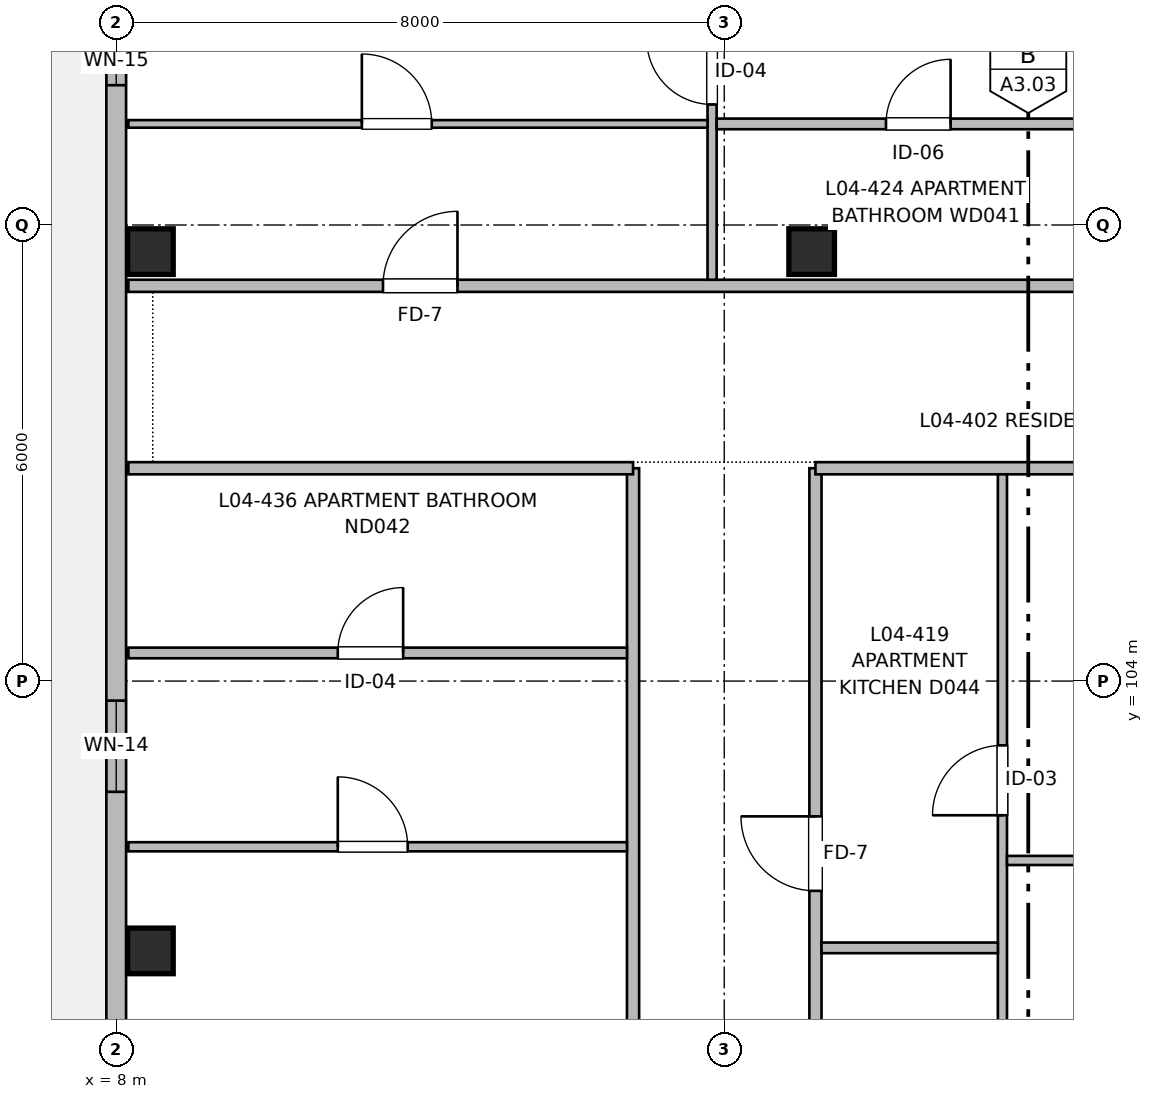
"""IFC4 building model, lengths in metres.
Left out: names, types, materials, properties, quantities, classifications, styles, units other than length and angle.
Written with IfcOpenShell. Run it as: python <this file> out.ifc"""

import sys

from ifc_helpers import new_model, si_unit, direction, frame, frame_2d, origin, origin_2d, place, context, subcontext, project, spatial, rectangle, extrude, element, fill, save


model = new_model("IFC4")
c1 = context("Model", 3, precision=1e-05, world=origin(), true_north=direction((0.0, 1.0)))
c2 = subcontext(c1, "Body", "Model", "MODEL_VIEW")
j1 = project(units=[si_unit("LENGTHUNIT", "METRE"), si_unit("PLANEANGLEUNIT", "RADIAN")], contexts=[c1])
p1 = place(None, origin())
s1 = spatial("IfcSite", under=j1, at=p1, CompositionType="ELEMENT")
p2 = place(p1, origin())
s2 = spatial("IfcBuilding", under=s1, at=p2, CompositionType="ELEMENT")
p3 = place(p2, frame((0.0, 0.0, 13.76)))
s3 = spatial("IfcBuildingStorey", under=s2, at=p3, CompositionType="ELEMENT", Elevation=13.76)
for number, where, z_axis, x_axis in (
    (1, (8.45, 100.45, 0.0), (0.0, 0.0, 1.0), (1.0, 0.0, 0.0)),
    (2, (8.45, 109.65, 0.0), (0.0, 0.0, 1.0), (1.0, 0.0, 0.0)),
    (3, (17.15, 109.65, 0.0), (0.0, 0.0, 1.0), (1.0, 0.0, 0.0)),
):
    element("IfcColumn", number, at=place(p3, frame(where, z_axis=z_axis, x_axis=x_axis)), inside=s3, PredefinedType="COLUMN", context=c2, shape_type="SweptSolid", body=[
        extrude(rectangle(XDim=0.6, YDim=0.6, at=origin_2d()), origin(), (0.0, 0.0, 1.0), 3.2),
    ])
p4 = place(p3, frame((8.0, 56.0, 0.0), z_axis=(0.0, 0.0, 1.0), x_axis=(0.0, 1.0, 0.0)))
e4 = element("IfcWall", 4, at=p4, inside=s3, PredefinedType="SOLIDWALL", context=c2, shape_type="SweptSolid", body=[
    extrude(rectangle(XDim=60.0, YDim=0.26, at=frame_2d((30.0, 0.0))), origin(), (0.0, 0.0, 1.0), 2.98),
])
p5 = place(p4, frame((3.686, 0.0, 0.0)))
e5 = element("IfcOpeningElement", 5, at=p5, cuts=e4, PredefinedType="OPENING", context=c2, shape_type="SweptSolid", body=[
    extrude(rectangle(XDim=1.2, YDim=2.2, at=frame_2d((0.6, 1.1))), frame((0.0, 0.14, 0.0), z_axis=(0.0, -1.0, 0.0), x_axis=(1.0, 0.0, 0.0)), (0.0, 0.0, 1.0), 0.28),
])
p6 = place(p4, frame((5.586, 0.0, 0.9)))
e6 = element("IfcOpeningElement", 6, at=p6, cuts=e4, PredefinedType="OPENING", context=c2, shape_type="SweptSolid", body=[
    extrude(rectangle(XDim=1.05, YDim=1.15, at=frame_2d((0.525, 0.575))), frame((0.0, 0.14, 0.0), z_axis=(0.0, -1.0, 0.0), x_axis=(1.0, 0.0, 0.0)), (0.0, 0.0, 1.0), 0.28),
])
p7 = place(p4, frame((12.207, 0.0, 0.82)))
e7 = element("IfcOpeningElement", 7, at=p7, cuts=e4, PredefinedType="OPENING", context=c2, shape_type="SweptSolid", body=[
    extrude(rectangle(XDim=1.3, YDim=1.4, at=frame_2d((0.65, 0.7))), frame((0.0, 0.14, 0.0), z_axis=(0.0, -1.0, 0.0), x_axis=(1.0, 0.0, 0.0)), (0.0, 0.0, 1.0), 0.28),
])
p8 = place(p4, frame((19.079, 0.0, 0.67)))
e8 = element("IfcOpeningElement", 8, at=p8, cuts=e4, PredefinedType="OPENING", context=c2, shape_type="SweptSolid", body=[
    extrude(rectangle(XDim=2.1, YDim=1.55, at=frame_2d((1.05, 0.775))), frame((0.0, 0.14, 0.0), z_axis=(0.0, -1.0, 0.0), x_axis=(1.0, 0.0, 0.0)), (0.0, 0.0, 1.0), 0.28),
])
p9 = place(p4, frame((29.325, 0.0, 0.72)))
e9 = element("IfcOpeningElement", 9, at=p9, cuts=e4, PredefinedType="OPENING", context=c2, shape_type="SweptSolid", body=[
    extrude(rectangle(XDim=2.25, YDim=1.5, at=frame_2d((1.125, 0.75))), frame((0.0, 0.14, 0.0), z_axis=(0.0, -1.0, 0.0), x_axis=(1.0, 0.0, 0.0)), (0.0, 0.0, 1.0), 0.28),
])
p10 = place(p4, frame((38.046, 0.0, 0.9)))
e10 = element("IfcOpeningElement", 10, at=p10, cuts=e4, PredefinedType="OPENING", context=c2, shape_type="SweptSolid", body=[
    extrude(rectangle(XDim=1.05, YDim=1.15, at=frame_2d((0.525, 0.575))), frame((0.0, 0.14, 0.0), z_axis=(0.0, -1.0, 0.0), x_axis=(1.0, 0.0, 0.0)), (0.0, 0.0, 1.0), 0.28),
])
p11 = place(p4, frame((46.543, 0.0, 0.9)))
e11 = element("IfcOpeningElement", 11, at=p11, cuts=e4, PredefinedType="OPENING", context=c2, shape_type="SweptSolid", body=[
    extrude(rectangle(XDim=1.2, YDim=1.05, at=frame_2d((0.6, 0.525))), frame((0.0, 0.14, 0.0), z_axis=(0.0, -1.0, 0.0), x_axis=(1.0, 0.0, 0.0)), (0.0, 0.0, 1.0), 0.28),
])
p12 = place(p4, frame((55.839, 0.0, 0.9)))
e12 = element("IfcOpeningElement", 12, at=p12, cuts=e4, PredefinedType="OPENING", context=c2, shape_type="SweptSolid", body=[
    extrude(rectangle(XDim=0.65, YDim=0.95, at=frame_2d((0.325, 0.475))), frame((0.0, 0.14, 0.0), z_axis=(0.0, -1.0, 0.0), x_axis=(1.0, 0.0, 0.0)), (0.0, 0.0, 1.0), 0.28),
])
p13 = place(p3, frame((14.8, 56.16, 0.0), z_axis=(0.0, 0.0, 1.0), x_axis=(0.0, 1.0, 0.0)))
e13 = element("IfcWall", 13, at=p13, inside=s3, PredefinedType="PARTITIONING", context=c2, shape_type="SweptSolid", body=[
    extrude(rectangle(XDim=50.64, YDim=0.16, at=frame_2d((25.32, 0.0))), origin(), (0.0, 0.0, 1.0), 2.935),
])
p14 = place(p13, frame((12.84, 0.0, 0.0)))
e14 = element("IfcOpeningElement", 14, at=p14, cuts=e13, PredefinedType="OPENING", context=c2, shape_type="SweptSolid", body=[
    extrude(rectangle(XDim=1.1, YDim=2.15, at=frame_2d((0.55, 1.075))), frame((0.0, 0.09, 0.0), z_axis=(0.0, -1.0, 0.0), x_axis=(1.0, 0.0, 0.0)), (0.0, 0.0, 1.0), 0.18),
])
p15 = place(p13, frame((19.24, 0.0, 0.0)))
e15 = element("IfcOpeningElement", 15, at=p15, cuts=e13, PredefinedType="OPENING", context=c2, shape_type="SweptSolid", body=[
    extrude(rectangle(XDim=1.6, YDim=2.15, at=frame_2d((0.8, 1.075))), frame((0.0, 0.09, 0.0), z_axis=(0.0, -1.0, 0.0), x_axis=(1.0, 0.0, 0.0)), (0.0, 0.0, 1.0), 0.18),
])
p16 = place(p13, frame((1.8, 0.0, 0.0)))
e16 = element("IfcOpeningElement", 16, at=p16, cuts=e13, PredefinedType="OPENING", context=c2, shape_type="SweptSolid", body=[
    extrude(rectangle(XDim=0.96, YDim=2.15, at=frame_2d((0.48, 1.075))), frame((0.0, 0.09, 0.0), z_axis=(0.0, -1.0, 0.0), x_axis=(1.0, 0.0, 0.0)), (0.0, 0.0, 1.0), 0.18),
])
p17 = place(p13, frame((32.745, 0.0, 0.0)))
e17 = element("IfcOpeningElement", 17, at=p17, cuts=e13, PredefinedType="OPENING", context=c2, shape_type="SweptSolid", body=[
    extrude(rectangle(XDim=0.98, YDim=2.15, at=frame_2d((0.49, 1.075))), frame((0.0, 0.09, 0.0), z_axis=(0.0, -1.0, 0.0), x_axis=(1.0, 0.0, 0.0)), (0.0, 0.0, 1.0), 0.18),
])
p18 = place(p13, frame((40.955, 0.0, 0.0)))
e18 = element("IfcOpeningElement", 18, at=p18, cuts=e13, PredefinedType="OPENING", context=c2, shape_type="SweptSolid", body=[
    extrude(rectangle(XDim=0.98, YDim=2.15, at=frame_2d((0.49, 1.075))), frame((0.0, 0.09, 0.0), z_axis=(0.0, -1.0, 0.0), x_axis=(1.0, 0.0, 0.0)), (0.0, 0.0, 1.0), 0.18),
])
p19 = place(p3, frame((17.2, 56.16, 0.0), z_axis=(0.0, 0.0, 1.0), x_axis=(0.0, 1.0, 0.0)))
e19 = element("IfcWall", 19, at=p19, inside=s3, PredefinedType="PARTITIONING", context=c2, shape_type="SweptSolid", body=[
    extrude(rectangle(XDim=50.64, YDim=0.16, at=frame_2d((25.32, 0.0))), origin(), (0.0, 0.0, 1.0), 2.935),
])
p20 = place(p19, frame((6.99, 0.0, 0.0)))
e20 = element("IfcOpeningElement", 20, at=p20, cuts=e19, PredefinedType="OPENING", context=c2, shape_type="SweptSolid", body=[
    extrude(rectangle(XDim=0.98, YDim=2.15, at=frame_2d((0.49, 1.075))), frame((0.0, 0.09, 0.0), z_axis=(0.0, -1.0, 0.0), x_axis=(1.0, 0.0, 0.0)), (0.0, 0.0, 1.0), 0.18),
])
p21 = place(p19, frame((20.92, 0.0, 0.0)))
e21 = element("IfcOpeningElement", 21, at=p21, cuts=e19, PredefinedType="OPENING", context=c2, shape_type="SweptSolid", body=[
    extrude(rectangle(XDim=0.98, YDim=2.15, at=frame_2d((0.49, 1.075))), frame((0.0, 0.09, 0.0), z_axis=(0.0, -1.0, 0.0), x_axis=(1.0, 0.0, 0.0)), (0.0, 0.0, 1.0), 0.18),
])
p22 = place(p19, frame((33.68, 0.0, 0.0)))
e22 = element("IfcOpeningElement", 22, at=p22, cuts=e19, PredefinedType="OPENING", context=c2, shape_type="SweptSolid", body=[
    extrude(rectangle(XDim=0.98, YDim=2.15, at=frame_2d((0.49, 1.075))), frame((0.0, 0.09, 0.0), z_axis=(0.0, -1.0, 0.0), x_axis=(1.0, 0.0, 0.0)), (0.0, 0.0, 1.0), 0.18),
])
p23 = place(p19, frame((45.08, 0.0, 0.0)))
e23 = element("IfcOpeningElement", 23, at=p23, cuts=e19, PredefinedType="OPENING", context=c2, shape_type="SweptSolid", body=[
    extrude(rectangle(XDim=0.98, YDim=2.15, at=frame_2d((0.49, 1.075))), frame((0.0, 0.09, 0.0), z_axis=(0.0, -1.0, 0.0), x_axis=(1.0, 0.0, 0.0)), (0.0, 0.0, 1.0), 0.18),
])
p24 = place(p3, frame((8.16, 106.8, 0.0), z_axis=(0.0, 0.0, 1.0), x_axis=(1.0, 0.0, 0.0)))
e24 = element("IfcWall", 24, at=p24, inside=s3, PredefinedType="PARTITIONING", context=c2, shape_type="SweptSolid", body=[
    extrude(rectangle(XDim=6.64, YDim=0.16, at=frame_2d((3.32, 0.0))), origin(), (0.0, 0.0, 1.0), 2.935),
])
p25 = place(p3, frame((17.2, 106.8, 0.0), z_axis=(0.0, 0.0, 1.0), x_axis=(1.0, 0.0, 0.0)))
e25 = element("IfcWall", 25, at=p25, inside=s3, PredefinedType="PARTITIONING", context=c2, shape_type="SweptSolid", body=[
    extrude(rectangle(XDim=17.64, YDim=0.16, at=frame_2d((8.82, 0.0))), origin(), (0.0, 0.0, 1.0), 2.935),
])
p26 = place(p25, frame((13.075, 0.0, 0.0)))
e26 = element("IfcOpeningElement", 26, at=p26, cuts=e25, PredefinedType="OPENING", context=c2, shape_type="SweptSolid", body=[
    extrude(rectangle(XDim=1.05, YDim=2.15, at=frame_2d((0.525, 1.075))), frame((0.0, 0.09, 0.0), z_axis=(0.0, -1.0, 0.0), x_axis=(1.0, 0.0, 0.0)), (0.0, 0.0, 1.0), 0.18),
])
p27 = place(p3, frame((8.16, 109.2, 0.0), z_axis=(0.0, 0.0, 1.0), x_axis=(1.0, 0.0, 0.0)))
e27 = element("IfcWall", 27, at=p27, inside=s3, PredefinedType="PARTITIONING", context=c2, shape_type="SweptSolid", body=[
    extrude(rectangle(XDim=26.68, YDim=0.16, at=frame_2d((13.34, 0.0))), origin(), (0.0, 0.0, 1.0), 2.935),
])
p28 = place(p27, frame((3.35, 0.0, 0.0)))
e28 = element("IfcOpeningElement", 28, at=p28, cuts=e27, PredefinedType="OPENING", context=c2, shape_type="SweptSolid", body=[
    extrude(rectangle(XDim=0.98, YDim=2.15, at=frame_2d((0.49, 1.075))), frame((0.0, 0.09, 0.0), z_axis=(0.0, -1.0, 0.0), x_axis=(1.0, 0.0, 0.0)), (0.0, 0.0, 1.0), 0.18),
])
p29 = place(p27, frame((15.985, 0.0, 0.0)))
e29 = element("IfcOpeningElement", 29, at=p29, cuts=e27, PredefinedType="OPENING", context=c2, shape_type="SweptSolid", body=[
    extrude(rectangle(XDim=0.98, YDim=2.15, at=frame_2d((0.49, 1.075))), frame((0.0, 0.09, 0.0), z_axis=(0.0, -1.0, 0.0), x_axis=(1.0, 0.0, 0.0)), (0.0, 0.0, 1.0), 0.18),
])
p30 = place(p3, frame((19.66, 95.18, 0.0), z_axis=(0.0, 0.0, 1.0), x_axis=(0.0, 1.0, 0.0)))
e30 = element("IfcWall", 30, at=p30, inside=s3, PredefinedType="PARTITIONING", context=c2, shape_type="SweptSolid", body=[
    extrude(rectangle(XDim=11.54, YDim=0.12, at=frame_2d((5.77, 0.0))), origin(), (0.0, 0.0, 1.0), 2.935),
])
p31 = place(p30, frame((2.018, 0.0, 0.0)))
e31 = element("IfcOpeningElement", 31, at=p31, cuts=e30, PredefinedType="OPENING", context=c2, shape_type="SweptSolid", body=[
    extrude(rectangle(XDim=0.86, YDim=2.1, at=frame_2d((0.43, 1.05))), frame((0.0, 0.07, 0.0), z_axis=(0.0, -1.0, 0.0), x_axis=(1.0, 0.0, 0.0)), (0.0, 0.0, 1.0), 0.14),
])
p32 = place(p30, frame((7.054, 0.0, 0.0)))
e32 = element("IfcOpeningElement", 32, at=p32, cuts=e30, PredefinedType="OPENING", context=c2, shape_type="SweptSolid", body=[
    extrude(rectangle(XDim=0.92, YDim=2.1, at=frame_2d((0.46, 1.05))), frame((0.0, 0.07, 0.0), z_axis=(0.0, -1.0, 0.0), x_axis=(1.0, 0.0, 0.0)), (0.0, 0.0, 1.0), 0.14),
])
p33 = place(p3, frame((17.28, 100.49, 0.0), z_axis=(0.0, 0.0, 1.0), x_axis=(1.0, 0.0, 0.0)))
e33 = element("IfcWall", 33, at=p33, inside=s3, PredefinedType="PARTITIONING", context=c2, shape_type="SweptSolid", body=[
    extrude(rectangle(XDim=2.32, YDim=0.14, at=frame_2d((1.16, 0.0))), origin(), (0.0, 0.0, 1.0), 2.73),
])
p34 = place(p3, frame((19.72, 101.64, 0.0), z_axis=(0.0, 0.0, 1.0), x_axis=(1.0, 0.0, 0.0)))
e34 = element("IfcWall", 34, at=p34, inside=s3, PredefinedType="PARTITIONING", context=c2, shape_type="SweptSolid", body=[
    extrude(rectangle(XDim=4.19, YDim=0.12, at=frame_2d((2.095, 0.0))), origin(), (0.0, 0.0, 1.0), 2.935),
])
p35 = place(p34, frame((1.645, 0.0, 0.0)))
e35 = element("IfcOpeningElement", 35, at=p35, cuts=e34, PredefinedType="OPENING", context=c2, shape_type="SweptSolid", body=[
    extrude(rectangle(XDim=0.9, YDim=2.1, at=frame_2d((0.45, 1.05))), frame((0.0, 0.07, 0.0), z_axis=(0.0, -1.0, 0.0), x_axis=(1.0, 0.0, 0.0)), (0.0, 0.0, 1.0), 0.14),
])
p36 = place(p3, frame((15.84, 109.28, 0.0), z_axis=(0.0, 0.0, 1.0), x_axis=(0.0, 1.0, 0.0)))
e36 = element("IfcWall", 36, at=p36, inside=s3, PredefinedType="PARTITIONING", context=c2, shape_type="SweptSolid", body=[
    extrude(rectangle(XDim=6.59, YDim=0.12, at=frame_2d((3.295, 0.0))), origin(), (0.0, 0.0, 1.0), 2.935),
])
p37 = place(p36, frame((2.306, 0.0, 0.0)))
e37 = element("IfcOpeningElement", 37, at=p37, cuts=e36, PredefinedType="OPENING", context=c2, shape_type="SweptSolid", body=[
    extrude(rectangle(XDim=0.86, YDim=2.1, at=frame_2d((0.43, 1.05))), frame((0.0, 0.07, 0.0), z_axis=(0.0, -1.0, 0.0), x_axis=(1.0, 0.0, 0.0)), (0.0, 0.0, 1.0), 0.14),
])
p38 = place(p36, frame((4.093, 0.0, 0.0)))
e38 = element("IfcOpeningElement", 38, at=p38, cuts=e36, PredefinedType="OPENING", context=c2, shape_type="SweptSolid", body=[
    extrude(rectangle(XDim=0.9, YDim=2.1, at=frame_2d((0.45, 1.05))), frame((0.0, 0.07, 0.0), z_axis=(0.0, -1.0, 0.0), x_axis=(1.0, 0.0, 0.0)), (0.0, 0.0, 1.0), 0.14),
])
p39 = place(p3, frame((15.9, 111.33, 0.0), z_axis=(0.0, 0.0, 1.0), x_axis=(1.0, 0.0, 0.0)))
e39 = element("IfcWall", 39, at=p39, inside=s3, PredefinedType="PARTITIONING", context=c2, shape_type="SweptSolid", body=[
    extrude(rectangle(XDim=5.51, YDim=0.14, at=frame_2d((2.755, 0.0))), origin(), (0.0, 0.0, 1.0), 2.935),
])
p40 = place(p39, frame((2.228, 0.0, 0.0)))
e40 = element("IfcOpeningElement", 40, at=p40, cuts=e39, PredefinedType="OPENING", context=c2, shape_type="SweptSolid", body=[
    extrude(rectangle(XDim=0.85, YDim=2.05, at=frame_2d((0.425, 1.025))), frame((0.0, 0.08, 0.0), z_axis=(0.0, -1.0, 0.0), x_axis=(1.0, 0.0, 0.0)), (0.0, 0.0, 1.0), 0.16),
])
p41 = place(p3, frame((8.16, 111.33, 0.0), z_axis=(0.0, 0.0, 1.0), x_axis=(1.0, 0.0, 0.0)))
e41 = element("IfcWall", 41, at=p41, inside=s3, PredefinedType="PARTITIONING", context=c2, shape_type="SweptSolid", body=[
    extrude(rectangle(XDim=7.62, YDim=0.1, at=frame_2d((3.81, 0.0))), origin(), (0.0, 0.0, 1.0), 2.935),
])
p42 = place(p41, frame((3.072, 0.0, 0.0)))
e42 = element("IfcOpeningElement", 42, at=p42, cuts=e41, PredefinedType="OPENING", context=c2, shape_type="SweptSolid", body=[
    extrude(rectangle(XDim=0.92, YDim=2.1, at=frame_2d((0.46, 1.05))), frame((0.0, 0.06, 0.0), z_axis=(0.0, -1.0, 0.0), x_axis=(1.0, 0.0, 0.0)), (0.0, 0.0, 1.0), 0.12),
])
p43 = place(p3, frame((8.16, 101.82, 0.0), z_axis=(0.0, 0.0, 1.0), x_axis=(1.0, 0.0, 0.0)))
e43 = element("IfcWall", 43, at=p43, inside=s3, PredefinedType="PARTITIONING", context=c2, shape_type="SweptSolid", body=[
    extrude(rectangle(XDim=6.56, YDim=0.12, at=frame_2d((3.28, 0.0))), origin(), (0.0, 0.0, 1.0), 2.935),
])
p44 = place(p43, frame((2.755, 0.0, 0.0)))
e44 = element("IfcOpeningElement", 44, at=p44, cuts=e43, PredefinedType="OPENING", context=c2, shape_type="SweptSolid", body=[
    extrude(rectangle(XDim=0.92, YDim=2.1, at=frame_2d((0.46, 1.05))), frame((0.0, 0.07, 0.0), z_axis=(0.0, -1.0, 0.0), x_axis=(1.0, 0.0, 0.0)), (0.0, 0.0, 1.0), 0.14),
])
p45 = place(p3, frame((8.16, 104.37, 0.0), z_axis=(0.0, 0.0, 1.0), x_axis=(1.0, 0.0, 0.0)))
e45 = element("IfcWall", 45, at=p45, inside=s3, PredefinedType="PARTITIONING", context=c2, shape_type="SweptSolid", body=[
    extrude(rectangle(XDim=6.56, YDim=0.14, at=frame_2d((3.28, 0.0))), origin(), (0.0, 0.0, 1.0), 2.935),
])
p46 = place(p45, frame((2.755, 0.0, 0.0)))
e46 = element("IfcOpeningElement", 46, at=p46, cuts=e45, PredefinedType="OPENING", context=c2, shape_type="SweptSolid", body=[
    extrude(rectangle(XDim=0.86, YDim=2.1, at=frame_2d((0.43, 1.05))), frame((0.0, 0.08, 0.0), z_axis=(0.0, -1.0, 0.0), x_axis=(1.0, 0.0, 0.0)), (0.0, 0.0, 1.0), 0.16),
])
p47 = place(p11, origin())
e47 = element("IfcWindow", 47, at=p47, inside=s3, PartitioningType="SINGLE_PANEL", PredefinedType="WINDOW", context=c2, shape_type="SweptSolid", body=[
    extrude(rectangle(XDim=1.2, YDim=1.05, at=frame_2d((0.6, 0.525))), frame((0.0, 0.03, 0.0), z_axis=(0.0, -1.0, 0.0), x_axis=(1.0, 0.0, 0.0)), (0.0, 0.0, 1.0), 0.06),
])
fill(e11, e47)
p48 = place(p12, origin())
e48 = element("IfcWindow", 48, at=p48, inside=s3, PartitioningType="SINGLE_PANEL", PredefinedType="WINDOW", context=c2, shape_type="SweptSolid", body=[
    extrude(rectangle(XDim=0.65, YDim=0.95, at=frame_2d((0.325, 0.475))), frame((0.0, 0.03, 0.0), z_axis=(0.0, -1.0, 0.0), x_axis=(1.0, 0.0, 0.0)), (0.0, 0.0, 1.0), 0.06),
])
fill(e12, e48)
p49 = place(p32, origin())
e49 = element("IfcDoor", 49, at=p49, inside=s3, OperationType="SINGLE_SWING_LEFT", PredefinedType="DOOR", context=c2, shape_type="SweptSolid", body=[
    extrude(rectangle(XDim=0.92, YDim=2.1, at=frame_2d((0.46, 1.05))), frame((0.0, 0.025, 0.0), z_axis=(0.0, -1.0, 0.0), x_axis=(1.0, 0.0, 0.0)), (0.0, 0.0, 1.0), 0.05),
])
fill(e32, e49)
p50 = place(p23, origin())
e50 = element("IfcDoor", 50, at=p50, inside=s3, OperationType="SINGLE_SWING_RIGHT", PredefinedType="DOOR", context=c2, shape_type="SweptSolid", body=[
    extrude(rectangle(XDim=0.98, YDim=2.15, at=frame_2d((0.49, 1.075))), frame((0.0, 0.025, 0.0), z_axis=(0.0, -1.0, 0.0), x_axis=(1.0, 0.0, 0.0)), (0.0, 0.0, 1.0), 0.05),
])
fill(e23, e50)
p51 = place(p28, origin())
e51 = element("IfcDoor", 51, at=p51, inside=s3, OperationType="SINGLE_SWING_RIGHT", PredefinedType="DOOR", context=c2, shape_type="SweptSolid", body=[
    extrude(rectangle(XDim=0.98, YDim=2.15, at=frame_2d((0.49, 1.075))), frame((0.0, 0.025, 0.0), z_axis=(0.0, -1.0, 0.0), x_axis=(1.0, 0.0, 0.0)), (0.0, 0.0, 1.0), 0.05),
])
fill(e28, e51)
p52 = place(p42, origin())
e52 = element("IfcDoor", 52, at=p52, inside=s3, OperationType="SINGLE_SWING_LEFT", PredefinedType="DOOR", context=c2, shape_type="SweptSolid", body=[
    extrude(rectangle(XDim=0.92, YDim=2.1, at=frame_2d((0.46, 1.05))), frame((0.0, 0.025, 0.0), z_axis=(0.0, -1.0, 0.0), x_axis=(1.0, 0.0, 0.0)), (0.0, 0.0, 1.0), 0.05),
])
fill(e42, e52)
p53 = place(p37, origin())
e53 = element("IfcDoor", 53, at=p53, inside=s3, OperationType="SINGLE_SWING_RIGHT", PredefinedType="DOOR", context=c2, shape_type="SweptSolid", body=[
    extrude(rectangle(XDim=0.86, YDim=2.1, at=frame_2d((0.43, 1.05))), frame((0.0, 0.025, 0.0), z_axis=(0.0, -1.0, 0.0), x_axis=(1.0, 0.0, 0.0)), (0.0, 0.0, 1.0), 0.05),
])
fill(e37, e53)
p54 = place(p40, origin())
e54 = element("IfcDoor", 54, at=p54, inside=s3, OperationType="SINGLE_SWING_RIGHT", PredefinedType="DOOR", context=c2, shape_type="SweptSolid", body=[
    extrude(rectangle(XDim=0.85, YDim=2.05, at=frame_2d((0.425, 1.025))), frame((0.0, 0.025, 0.0), z_axis=(0.0, -1.0, 0.0), x_axis=(1.0, 0.0, 0.0)), (0.0, 0.0, 1.0), 0.05),
])
fill(e40, e54)
p55 = place(p46, origin())
e55 = element("IfcDoor", 55, at=p55, inside=s3, OperationType="SINGLE_SWING_RIGHT", PredefinedType="DOOR", context=c2, shape_type="SweptSolid", body=[
    extrude(rectangle(XDim=0.86, YDim=2.1, at=frame_2d((0.43, 1.05))), frame((0.0, 0.025, 0.0), z_axis=(0.0, -1.0, 0.0), x_axis=(1.0, 0.0, 0.0)), (0.0, 0.0, 1.0), 0.05),
])
fill(e46, e55)
p56 = place(p44, origin())
e56 = element("IfcDoor", 56, at=p56, inside=s3, OperationType="SINGLE_SWING_LEFT", PredefinedType="DOOR", context=c2, shape_type="SweptSolid", body=[
    extrude(rectangle(XDim=0.92, YDim=2.1, at=frame_2d((0.46, 1.05))), frame((0.0, 0.025, 0.0), z_axis=(0.0, -1.0, 0.0), x_axis=(1.0, 0.0, 0.0)), (0.0, 0.0, 1.0), 0.05),
])
fill(e44, e56)
save(model, sys.argv[1])
